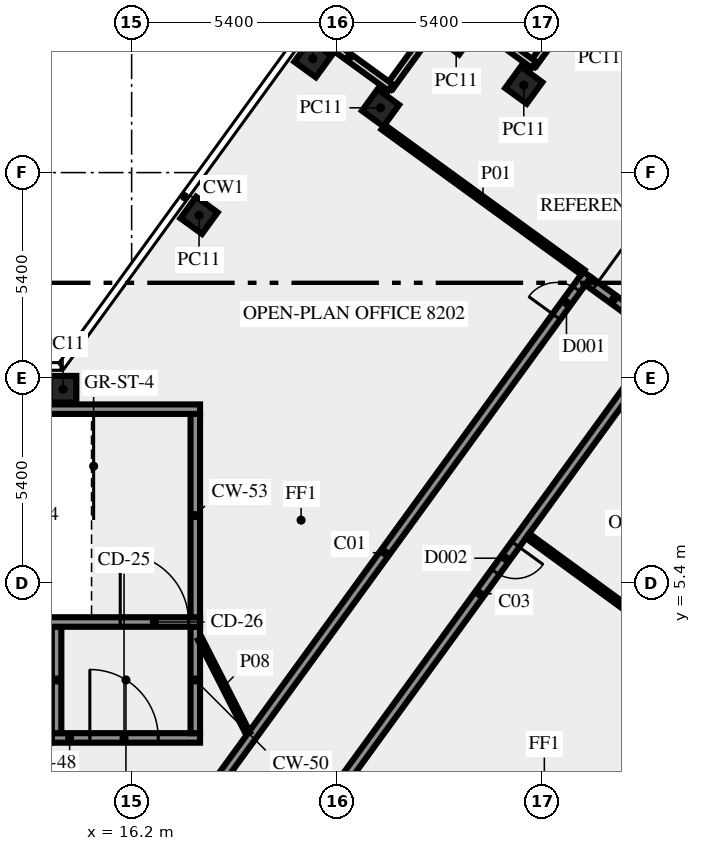
"""IFC4 building model, lengths in metres.
Left out: names, types, materials, properties, quantities, classifications, styles, units other than length and angle.
Written with IfcOpenShell. Run it as: python <this file> out.ifc"""

import sys

from ifc_helpers import new_model, si_unit, direction, frame, frame_2d, origin, origin_2d, place, context, subcontext, project, spatial, rectangle, extrude, element, fill, save


model = new_model("IFC4")
c1 = context("Model", 3, precision=1e-05, world=origin(), true_north=direction((0.0, 1.0)))
c2 = subcontext(c1, "Body", "Model", "MODEL_VIEW")
j1 = project(units=[si_unit("LENGTHUNIT", "METRE"), si_unit("PLANEANGLEUNIT", "RADIAN")], contexts=[c1])
p1 = place(None, origin())
s1 = spatial("IfcSite", under=j1, at=p1, CompositionType="ELEMENT")
p2 = place(p1, origin())
s2 = spatial("IfcBuilding", under=s1, at=p2, CompositionType="ELEMENT")
p3 = place(p2, frame((0.0, 0.0, 351.0)))
s3 = spatial("IfcBuildingStorey", under=s2, at=p3, CompositionType="ELEMENT", Elevation=351.0)
for number, where, z_axis, x_axis in (
    (1, (26.519, 18.5, 0.0), (0.0, 0.0, 1.0), (-0.809, 0.588, 0.0)),
    (2, (24.74, 19.795, 0.0), (0.0, 0.0, 1.0), (-0.588, -0.809, 0.0)),
    (3, (22.749, 17.904, 0.0), (0.0, 0.0, 1.0), (-0.588, -0.809, 0.0)),
    (4, (20.97, 19.195, 0.0), (0.0, 0.0, 1.0), (-0.588, -0.809, 0.0)),
    (5, (17.974, 15.075, 0.0), (0.0, 0.0, 1.0), (-0.588, -0.809, 0.0)),
    (6, (14.395, 10.5, 0.0), (0.0, 0.0, 1.0), (-1.0, 0.0, 0.0)),
):
    element("IfcColumn", number, at=place(p3, frame(where, z_axis=z_axis, x_axis=x_axis)), inside=s3, PredefinedType="COLUMN", context=c2, shape_type="SweptSolid", body=[
        extrude(rectangle(XDim=0.7, YDim=0.7, at=origin_2d()), origin(), (0.0, 0.0, 1.0), 3.2),
    ])
for number, where, z_axis, x_axis in (
    (7, (28.354, 21.247, 0.0), (0.0, 0.0, 1.0), (-0.588, -0.809, 0.0)),
    (8, (26.785, 19.036, 0.0), (0.0, 0.0, 1.0), (-0.809, 0.588, 0.0)),
):
    element("IfcWall", number, at=place(p3, frame(where, z_axis=z_axis, x_axis=x_axis)), inside=s3, PredefinedType="SOLIDWALL", context=c2, shape_type="SweptSolid", body=[
        extrude(rectangle(XDim=2.7, YDim=0.2, at=frame_2d((1.35, 0.0))), origin(), (0.0, 0.0, 1.0), 3.2),
    ])
for number, where, z_axis, x_axis in (
    (9, (24.583, 20.65, 0.0), (0.0, 0.0, 1.0), (-0.588, -0.809, 0.0)),
    (10, (23.013, 18.438, 0.0), (0.0, 0.0, 1.0), (-0.809, 0.588, 0.0)),
):
    element("IfcWall", number, at=place(p3, frame(where, z_axis=z_axis, x_axis=x_axis)), inside=s3, PredefinedType="SOLIDWALL", context=c2, shape_type="SweptSolid", body=[
        extrude(rectangle(XDim=2.7, YDim=0.2, at=frame_2d((1.35, 0.0))), origin(), (0.0, 0.0, 1.0), 3.2),
    ])
p4 = place(p3, frame((14.1, 1.325, 0.0), z_axis=(0.0, 0.0, 1.0), x_axis=(1.0, 0.0, 0.0)))
e11 = element("IfcWall", 11, at=p4, inside=s3, PredefinedType="SHEAR", context=c2, shape_type="SweptSolid", body=[
    extrude(rectangle(XDim=3.9, YDim=0.25, at=frame_2d((1.95, 0.0))), origin(), (0.0, 0.0, 1.0), 3.2),
])
p5 = place(p4, frame((1.0, 0.0, 0.0)))
e12 = element("IfcOpeningElement", 12, at=p5, cuts=e11, PredefinedType="OPENING", context=c2, shape_type="SweptSolid", body=[
    extrude(rectangle(XDim=1.8, YDim=2.1, at=frame_2d((0.9, 1.05))), frame((0.0, 0.135, 0.0), z_axis=(0.0, -1.0, 0.0), x_axis=(1.0, 0.0, 0.0)), (0.0, 0.0, 1.0), 0.27),
])
for number, where, z_axis, x_axis in (
    (13, (14.225, 1.45, 0.0), (0.0, 0.0, 1.0), (0.0, 1.0, 0.0)),
    (14, (17.875, 1.45, 0.0), (0.0, 0.0, 1.0), (0.0, 1.0, 0.0)),
):
    element("IfcWall", number, at=place(p3, frame(where, z_axis=z_axis, x_axis=x_axis)), inside=s3, PredefinedType="SHEAR", context=c2, shape_type="SweptSolid", body=[
        extrude(rectangle(XDim=2.8, YDim=0.25, at=frame_2d((1.4, 0.0))), origin(), (0.0, 0.0, 1.0), 3.2),
    ])
p6 = place(p3, frame((7.5, 4.375, 0.0), z_axis=(0.0, 0.0, 1.0), x_axis=(1.0, 0.0, 0.0)))
e15 = element("IfcWall", 15, at=p6, inside=s3, PredefinedType="SHEAR", context=c2, shape_type="SweptSolid", body=[
    extrude(rectangle(XDim=10.5, YDim=0.25, at=frame_2d((5.25, 0.0))), origin(), (0.0, 0.0, 1.0), 3.2),
])
p7 = place(p6, frame((8.4, 0.0, 0.0)))
e16 = element("IfcOpeningElement", 16, at=p7, cuts=e15, PredefinedType="OPENING", context=c2, shape_type="SweptSolid", body=[
    extrude(rectangle(XDim=1.8, YDim=2.1, at=frame_2d((0.9, 1.05))), frame((0.0, 0.135, 0.0), z_axis=(0.0, -1.0, 0.0), x_axis=(1.0, 0.0, 0.0)), (0.0, 0.0, 1.0), 0.27),
])
p8 = place(p3, frame((17.875, 4.5, 0.0), z_axis=(0.0, 0.0, 1.0), x_axis=(0.0, 1.0, 0.0)))
e17 = element("IfcWall", 17, at=p8, inside=s3, PredefinedType="SHEAR", context=c2, shape_type="SweptSolid", body=[
    extrude(rectangle(XDim=5.35, YDim=0.25, at=frame_2d((2.675, 0.0))), origin(), (0.0, 0.0, 1.0), 3.2),
])
p9 = place(p3, frame((7.5, 9.975, 0.0), z_axis=(0.0, 0.0, 1.0), x_axis=(1.0, 0.0, 0.0)))
e18 = element("IfcWall", 18, at=p9, inside=s3, PredefinedType="SHEAR", context=c2, shape_type="SweptSolid", body=[
    extrude(rectangle(XDim=10.5, YDim=0.25, at=frame_2d((5.25, 0.0))), origin(), (0.0, 0.0, 1.0), 3.2),
])
p10 = place(p9, frame((2.0, 0.0, 1.0)))
e19 = element("IfcOpeningElement", 19, at=p10, cuts=e18, PredefinedType="OPENING", context=c2, shape_type="SweptSolid", body=[
    extrude(rectangle(XDim=1.2, YDim=1.2, at=frame_2d((0.6, 0.6))), frame((0.0, 0.135, 0.0), z_axis=(0.0, -1.0, 0.0), x_axis=(1.0, 0.0, 0.0)), (0.0, 0.0, 1.0), 0.27),
])
p11 = place(p3, frame((17.545, -1.125, 0.0), z_axis=(0.0, 0.0, 1.0), x_axis=(0.58779555165, 0.809009511354, 0.0)))
e20 = element("IfcWall", 20, at=p11, inside=s3, PredefinedType="SOLIDWALL", context=c2, shape_type="SweptSolid", body=[
    extrude(rectangle(XDim=18.103, YDim=0.25, at=frame_2d((9.052, 0.0))), origin(), (0.0, 0.0, 1.0), 3.2),
])
p12 = place(p11, frame((16.728, 0.0, 0.0)))
e21 = element("IfcOpeningElement", 21, at=p12, cuts=e20, PredefinedType="OPENING", context=c2, shape_type="SweptSolid", body=[
    extrude(rectangle(XDim=0.9, YDim=2.1, at=frame_2d((0.45, 1.05))), frame((0.0, 0.135, 0.0), z_axis=(0.0, -1.0, 0.0), x_axis=(1.0, 0.0, 0.0)), (0.0, 0.0, 1.0), 0.27),
])
p13 = place(p3, frame((28.213, 13.346, 0.0), z_axis=(0.0, 0.0, 1.0), x_axis=(0.809006914995, -0.587799125119, 0.0)))
e22 = element("IfcWall", 22, at=p13, inside=s3, PredefinedType="SOLIDWALL", context=c2, shape_type="SweptSolid", body=[
    extrude(rectangle(XDim=2.65, YDim=0.25, at=frame_2d((1.325, 0.0))), origin(), (0.0, 0.0, 1.0), 3.2),
])
p14 = place(p13, frame((0.225, 0.0, 0.0)))
e23 = element("IfcOpeningElement", 23, at=p14, cuts=e22, PredefinedType="OPENING", context=c2, shape_type="SweptSolid", body=[
    extrude(rectangle(XDim=1.2, YDim=2.1, at=frame_2d((0.6, 1.05))), frame((0.0, 0.135, 0.0), z_axis=(0.0, -1.0, 0.0), x_axis=(1.0, 0.0, 0.0)), (0.0, 0.0, 1.0), 0.27),
])
p15 = place(p3, frame((30.183, 11.761, 0.0), z_axis=(0.0, 0.0, 1.0), x_axis=(-0.587781762867, -0.80901952958, 0.0)))
e24 = element("IfcWall", 24, at=p15, inside=s3, PredefinedType="SOLIDWALL", context=c2, shape_type="SweptSolid", body=[
    extrude(rectangle(XDim=16.42, YDim=0.25, at=frame_2d((8.21, 0.0))), origin(), (0.0, 0.0, 1.0), 3.2),
])
p16 = place(p15, frame((0.225, 0.0, 0.0)))
e25 = element("IfcOpeningElement", 25, at=p16, cuts=e24, PredefinedType="OPENING", context=c2, shape_type="SweptSolid", body=[
    extrude(rectangle(XDim=0.9, YDim=2.1, at=frame_2d((0.45, 1.05))), frame((0.0, 0.135, 0.0), z_axis=(0.0, -1.0, 0.0), x_axis=(1.0, 0.0, 0.0)), (0.0, 0.0, 1.0), 0.27),
])
p17 = place(p15, frame((6.605, 0.0, 0.0)))
e26 = element("IfcOpeningElement", 26, at=p17, cuts=e24, PredefinedType="OPENING", context=c2, shape_type="SweptSolid", body=[
    extrude(rectangle(XDim=0.9, YDim=2.1, at=frame_2d((0.45, 1.05))), frame((0.0, 0.135, 0.0), z_axis=(0.0, -1.0, 0.0), x_axis=(1.0, 0.0, 0.0)), (0.0, 0.0, 1.0), 0.27),
])
p18 = place(p3, frame((28.073, 13.578, 0.0), z_axis=(0.0, 0.0, 1.0), x_axis=(-0.809000932727, 0.587807358619, 0.0)))
e27 = element("IfcWall", 27, at=p18, inside=s3, PredefinedType="PARTITIONING", context=c2, shape_type="SweptSolid", body=[
    extrude(rectangle(XDim=6.496, YDim=0.15, at=frame_2d((3.248, 0.0))), origin(), (0.0, 0.0, 1.0), 3.2),
])
p19 = place(p3, frame((26.619, 6.643, 0.0), z_axis=(0.0, 0.0, 1.0), x_axis=(0.807594822539, -0.589737740532, 0.0)))
e28 = element("IfcWall", 28, at=p19, inside=s3, PredefinedType="PARTITIONING", context=c2, shape_type="SweptSolid", body=[
    extrude(rectangle(XDim=9.55, YDim=0.15, at=frame_2d((4.775, 0.0))), origin(), (0.0, 0.0, 1.0), 2.5),
])
p20 = place(p3, frame((18.0, 3.925, 0.0), z_axis=(0.0, 0.0, 1.0), x_axis=(0.453950796792, -0.891026752736, 0.0)))
e29 = element("IfcWall", 29, at=p20, inside=s3, PredefinedType="PARTITIONING", context=c2, shape_type="SweptSolid", body=[
    extrude(rectangle(XDim=2.778, YDim=0.12, at=frame_2d((1.389, 0.0))), origin(), (0.0, 0.0, 1.0), 3.2),
])
p21 = place(p5, origin())
e30 = element("IfcDoor", 30, at=p21, inside=s3, OperationType="DOUBLE_DOOR_SINGLE_SWING", PredefinedType="DOOR", context=c2, shape_type="SweptSolid", body=[
    extrude(rectangle(XDim=1.8, YDim=2.1, at=frame_2d((0.9, 1.05))), frame((0.0, 0.025, 0.0), z_axis=(0.0, -1.0, 0.0), x_axis=(1.0, 0.0, 0.0)), (0.0, 0.0, 1.0), 0.05),
])
fill(e12, e30)
p22 = place(p7, origin())
e31 = element("IfcDoor", 31, at=p22, inside=s3, OperationType="DOUBLE_DOOR_SINGLE_SWING", PredefinedType="DOOR", context=c2, shape_type="SweptSolid", body=[
    extrude(rectangle(XDim=1.8, YDim=2.1, at=frame_2d((0.9, 1.05))), frame((0.0, 0.025, 0.0), z_axis=(0.0, -1.0, 0.0), x_axis=(1.0, 0.0, 0.0)), (0.0, 0.0, 1.0), 0.05),
])
fill(e16, e31)
p23 = place(p12, origin())
e32 = element("IfcDoor", 32, at=p23, inside=s3, OperationType="SINGLE_SWING_RIGHT", PredefinedType="DOOR", context=c2, shape_type="SweptSolid", body=[
    extrude(rectangle(XDim=0.9, YDim=2.1, at=frame_2d((0.45, 1.05))), frame((0.0, 0.025, 0.0), z_axis=(0.0, -1.0, 0.0), x_axis=(1.0, 0.0, 0.0)), (0.0, 0.0, 1.0), 0.05),
])
fill(e21, e32)
p24 = place(p14, origin())
e33 = element("IfcDoor", 33, at=p24, inside=s3, OperationType="SINGLE_SWING_LEFT", PredefinedType="DOOR", context=c2, shape_type="SweptSolid", body=[
    extrude(rectangle(XDim=1.2, YDim=2.1, at=frame_2d((0.6, 1.05))), frame((0.0, 0.025, 0.0), z_axis=(0.0, -1.0, 0.0), x_axis=(1.0, 0.0, 0.0)), (0.0, 0.0, 1.0), 0.05),
])
fill(e23, e33)
p25 = place(p17, origin())
e34 = element("IfcDoor", 34, at=p25, inside=s3, OperationType="SINGLE_SWING_LEFT", PredefinedType="DOOR", context=c2, shape_type="SweptSolid", body=[
    extrude(rectangle(XDim=0.9, YDim=2.1, at=frame_2d((0.45, 1.05))), frame((0.0, 0.025, 0.0), z_axis=(0.0, -1.0, 0.0), x_axis=(1.0, 0.0, 0.0)), (0.0, 0.0, 1.0), 0.05),
])
fill(e26, e34)
save(model, sys.argv[1])
